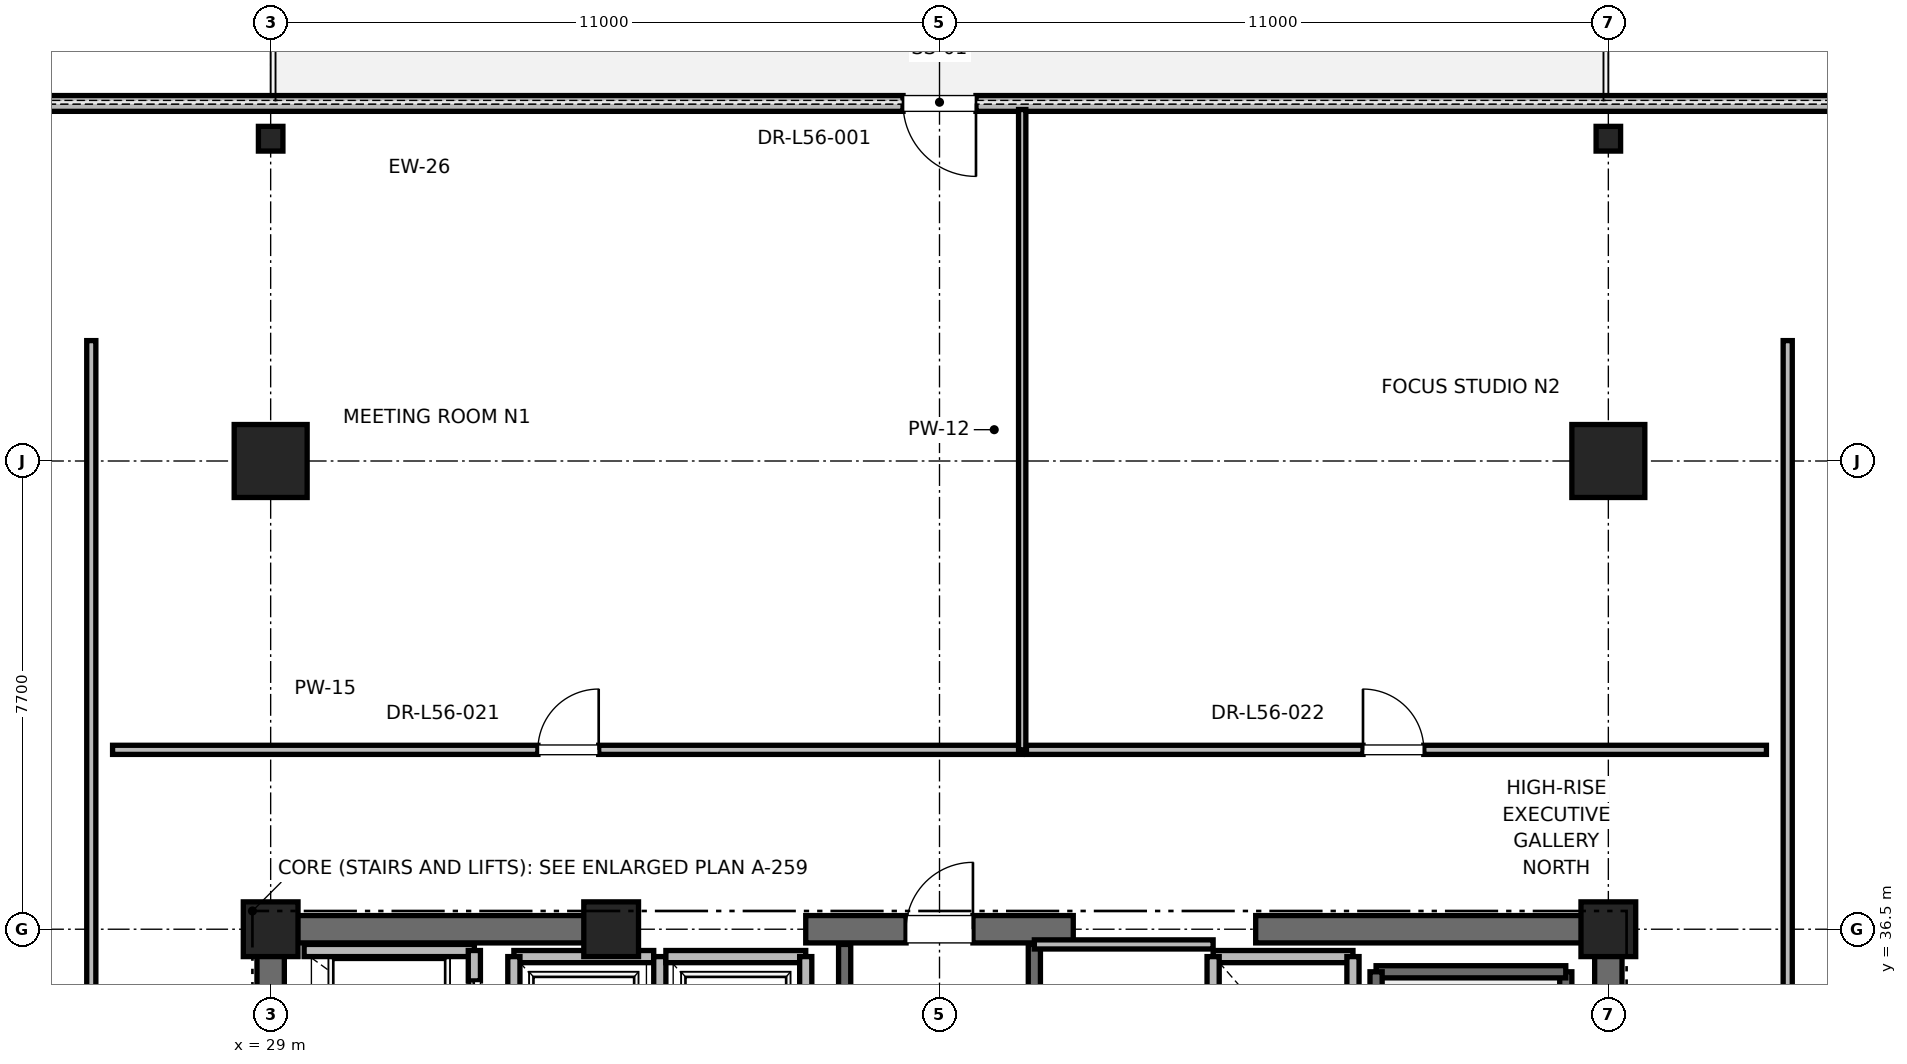
"""IFC4 building model, lengths in metres.
Left out: names, types, materials, properties, quantities, classifications, styles, units other than length and angle.
Written with IfcOpenShell. Run it as: python <this file> out.ifc"""

import sys

from ifc_helpers import new_model, si_unit, direction, frame, frame_2d, origin, origin_2d, place, context, subcontext, project, spatial, rectangle, i_section, extrude, element, fill, save


model = new_model("IFC4")
c1 = context("Model", 3, precision=1e-05, world=origin(), true_north=direction((0.0, 1.0)))
c2 = subcontext(c1, "Body", "Model", "MODEL_VIEW")
j1 = project(units=[si_unit("LENGTHUNIT", "METRE"), si_unit("PLANEANGLEUNIT", "RADIAN")], contexts=[c1])
p1 = place(None, origin())
s1 = spatial("IfcSite", under=j1, at=p1, CompositionType="ELEMENT")
p2 = place(p1, origin())
s2 = spatial("IfcBuilding", under=s1, at=p2, CompositionType="ELEMENT")
p3 = place(p2, frame((0.0, 0.0, 243.2)))
s3 = spatial("IfcBuildingStorey", under=s2, at=p3, CompositionType="ELEMENT", Elevation=243.2)
for number, where, z_axis, x_axis in (
    (1, (29.0, 44.2, 0.0), (0.0, 0.0, 1.0), (1.0, 0.0, 0.0)),
    (2, (51.0, 44.2, 0.0), (0.0, 0.0, 1.0), (1.0, 0.0, 0.0)),
):
    element("IfcColumn", number, at=place(p3, frame(where, z_axis=z_axis, x_axis=x_axis)), inside=s3, PredefinedType="COLUMN", context=c2, shape_type="SweptSolid", body=[
        extrude(rectangle(XDim=1.2, YDim=1.2, at=origin_2d()), origin(), (0.0, 0.0, 1.0), 4.0),
    ])
for number, where, z_axis, x_axis in (
    (3, (29.0, 49.5, 0.0), (0.0, 0.0, 1.0), (1.0, 0.0, 0.0)),
    (4, (51.0, 49.5, 0.0), (0.0, 0.0, 1.0), (1.0, 0.0, 0.0)),
):
    element("IfcColumn", number, at=place(p3, frame(where, z_axis=z_axis, x_axis=x_axis)), inside=s3, PredefinedType="COLUMN", context=c2, shape_type="SweptSolid", body=[
        extrude(i_section(OverallWidth=0.403, OverallDepth=0.406, WebThickness=0.027, FlangeThickness=0.043, FilletRadius=0.015, at=origin_2d()), origin(), (0.0, 0.0, 1.0), 4.0),
    ])
for number, where, z_axis, x_axis in (
    (5, (29.0, 36.5, 0.0), (0.0, 0.0, 1.0), (1.0, 0.0, 0.0)),
    (6, (51.0, 36.5, 0.0), (0.0, 0.0, 1.0), (1.0, 0.0, 0.0)),
    (7, (34.6, 36.5, 0.0), (0.0, 0.0, 1.0), (1.0, 0.0, 0.0)),
):
    element("IfcColumn", number, at=place(p3, frame(where, z_axis=z_axis, x_axis=x_axis)), inside=s3, PredefinedType="PILASTER", context=c2, shape_type="SweptSolid", body=[
        extrude(rectangle(XDim=0.9, YDim=0.9, at=origin_2d()), origin(), (0.0, 0.0, 1.0), 4.0),
    ])
p4 = place(p3, frame((29.0, 36.5, 0.0), z_axis=(0.0, 0.0, 1.0), x_axis=(1.0, 0.0, 0.0)))
e8 = element("IfcWall", 8, at=p4, inside=s3, PredefinedType="SHEAR", context=c2, shape_type="SweptSolid", body=[
    extrude(rectangle(XDim=5.8, YDim=0.45, at=frame_2d((2.9, 0.0))), origin(), (0.0, 0.0, 1.0), 3.785),
])
p5 = place(p3, frame((37.8, 36.5, 0.0), z_axis=(0.0, 0.0, 1.0), x_axis=(1.0, 0.0, 0.0)))
e9 = element("IfcWall", 9, at=p5, inside=s3, PredefinedType="SHEAR", context=c2, shape_type="SweptSolid", body=[
    extrude(rectangle(XDim=4.4, YDim=0.45, at=frame_2d((2.2, 0.0))), origin(), (0.0, 0.0, 1.0), 3.785),
])
p6 = place(p5, frame((1.65, 0.0, 0.0)))
e10 = element("IfcOpeningElement", 10, at=p6, cuts=e9, PredefinedType="OPENING", context=c2, shape_type="SweptSolid", body=[
    extrude(rectangle(XDim=1.1, YDim=2.15, at=frame_2d((0.55, 1.075))), frame((0.0, 0.225, 0.0), z_axis=(0.0, -1.0, 0.0), x_axis=(1.0, 0.0, 0.0)), (0.0, 0.0, 1.0), 0.45),
])
for number, where, z_axis, x_axis in (
    (11, (45.2, 36.5, 0.0), (0.0, 0.0, 1.0), (1.0, 0.0, 0.0)),
    (12, (29.0, 30.7, 0.0), (0.0, 0.0, 1.0), (0.0, 1.0, 0.0)),
):
    element("IfcWall", number, at=place(p3, frame(where, z_axis=z_axis, x_axis=x_axis)), inside=s3, PredefinedType="SHEAR", context=c2, shape_type="SweptSolid", body=[
        extrude(rectangle(XDim=5.8, YDim=0.45, at=frame_2d((2.9, 0.0))), origin(), (0.0, 0.0, 1.0), 3.785),
    ])
p7 = place(p3, frame((51.0, 27.7, 0.0), z_axis=(0.0, 0.0, 1.0), x_axis=(0.0, 1.0, 0.0)))
e13 = element("IfcWall", 13, at=p7, inside=s3, PredefinedType="SHEAR", context=c2, shape_type="SweptSolid", body=[
    extrude(rectangle(XDim=8.8, YDim=0.45, at=frame_2d((4.4, 0.0))), origin(), (0.0, 0.0, 1.0), 3.785),
])
p8 = place(p3, frame((62.308, 50.08, 0.0), z_axis=(0.0, 0.0, 1.0), x_axis=(-1.0, 0.0, 0.0)))
e14 = element("IfcWall", 14, at=p8, inside=s3, PredefinedType="PARAPET", context=c2, shape_type="SweptSolid", body=[
    extrude(rectangle(XDim=44.615, YDim=0.26, at=frame_2d((22.308, 0.0))), origin(), (0.0, 0.0, 1.0), 3.123),
])
p9 = place(p8, frame((4.2, 0.0, 0.85)))
e15 = element("IfcOpeningElement", 15, at=p9, cuts=e14, PredefinedType="OPENING", context=c2, shape_type="SweptSolid", body=[
    extrude(rectangle(XDim=1.6, YDim=2.1, at=frame_2d((0.8, 1.05))), frame((0.0, 0.13, 0.0), z_axis=(0.0, -1.0, 0.0), x_axis=(1.0, 0.0, 0.0)), (0.0, 0.0, 1.0), 0.26),
])
p10 = place(p8, frame((21.708, 0.0, 0.0)))
e16 = element("IfcOpeningElement", 16, at=p10, cuts=e14, PredefinedType="OPENING", context=c2, shape_type="SweptSolid", body=[
    extrude(rectangle(XDim=1.2, YDim=2.2, at=frame_2d((0.6, 1.1))), frame((0.0, 0.13, 0.0), z_axis=(0.0, -1.0, 0.0), x_axis=(1.0, 0.0, 0.0)), (0.0, 0.0, 1.0), 0.26),
])
p11 = place(p8, frame((38.815, 0.0, 0.85)))
e17 = element("IfcOpeningElement", 17, at=p11, cuts=e14, PredefinedType="OPENING", context=c2, shape_type="SweptSolid", body=[
    extrude(rectangle(XDim=1.6, YDim=2.1, at=frame_2d((0.8, 1.05))), frame((0.0, 0.13, 0.0), z_axis=(0.0, -1.0, 0.0), x_axis=(1.0, 0.0, 0.0)), (0.0, 0.0, 1.0), 0.26),
])
p12 = place(p3, frame((50.3, 27.65, 0.0), z_axis=(0.0, 0.0, 1.0), x_axis=(0.0, 1.0, 0.0)))
e18 = element("IfcWall", 18, at=p12, inside=s3, PredefinedType="SOLIDWALL", context=c2, shape_type="SweptSolid", body=[
    extrude(rectangle(XDim=8.15, YDim=0.2, at=frame_2d((4.075, 0.0))), origin(), (0.0, 0.0, 1.0), 3.785),
])
p13 = place(p3, frame((47.18, 35.8, 0.0), z_axis=(0.0, 0.0, 1.0), x_axis=(1.0, 0.0, 0.0)))
e19 = element("IfcWall", 19, at=p13, inside=s3, PredefinedType="SOLIDWALL", context=c2, shape_type="SweptSolid", body=[
    extrude(rectangle(XDim=3.12, YDim=0.2, at=frame_2d((1.56, 0.0))), origin(), (0.0, 0.0, 1.0), 3.785),
])
p14 = place(p3, frame((47.18, 27.62, 0.0), z_axis=(0.0, 0.0, 1.0), x_axis=(0.0, 1.0, 0.0)))
e20 = element("IfcWall", 20, at=p14, inside=s3, PredefinedType="SOLIDWALL", context=c2, shape_type="SweptSolid", body=[
    extrude(rectangle(XDim=8.18, YDim=0.2, at=frame_2d((4.09, 0.0))), origin(), (0.0, 0.0, 1.0), 3.785),
])
p15 = place(p3, frame((38.44, 27.38, 0.0), z_axis=(0.0, 0.0, 1.0), x_axis=(0.0, 1.0, 0.0)))
e21 = element("IfcWall", 21, at=p15, inside=s3, PredefinedType="SOLIDWALL", context=c2, shape_type="SweptSolid", body=[
    extrude(rectangle(XDim=8.87, YDim=0.2, at=frame_2d((4.435, 0.0))), origin(), (0.0, 0.0, 1.0), 3.785),
])
p16 = place(p3, frame((41.56, 27.68, 0.0), z_axis=(0.0, 0.0, 1.0), x_axis=(0.0, 1.0, 0.0)))
e22 = element("IfcWall", 22, at=p16, inside=s3, PredefinedType="SOLIDWALL", context=c2, shape_type="SweptSolid", body=[
    extrude(rectangle(XDim=8.57, YDim=0.2, at=frame_2d((4.285, 0.0))), origin(), (0.0, 0.0, 1.0), 3.785),
])
p17 = place(p3, frame((32.35, 36.15, 0.0), z_axis=(0.0, 0.0, 1.0), x_axis=(-1.0, 0.0, 0.0)))
e23 = element("IfcWall", 23, at=p17, inside=s3, PredefinedType="SOLIDWALL", context=c2, shape_type="SweptSolid", body=[
    extrude(rectangle(XDim=2.8, YDim=0.2, at=frame_2d((1.4, 0.0))), origin(), (0.0, 0.0, 1.0), 3.148),
])
p18 = place(p3, frame((32.35, 34.05, 0.0), z_axis=(0.0, 0.0, 1.0), x_axis=(0.0, 1.0, 0.0)))
e24 = element("IfcWall", 24, at=p18, inside=s3, PredefinedType="SOLIDWALL", context=c2, shape_type="SweptSolid", body=[
    extrude(rectangle(XDim=2.1, YDim=0.2, at=frame_2d((1.05, 0.0))), origin(), (0.0, 0.0, 1.0), 3.785),
])
p19 = place(p18, frame((0.5, 0.0, 0.0)))
e25 = element("IfcOpeningElement", 25, at=p19, cuts=e24, PredefinedType="OPENING", context=c2, shape_type="SweptSolid", body=[
    extrude(rectangle(XDim=1.1, YDim=2.2, at=frame_2d((0.55, 1.1))), frame((0.0, 0.1, 0.0), z_axis=(0.0, -1.0, 0.0), x_axis=(1.0, 0.0, 0.0)), (0.0, 0.0, 1.0), 0.2),
])
p20 = place(p3, frame((35.3, 36.05, 0.0), z_axis=(0.0, 0.0, 1.0), x_axis=(-1.0, 0.0, 0.0)))
e26 = element("IfcWall", 26, at=p20, inside=s3, PredefinedType="SOLIDWALL", context=c2, shape_type="SweptSolid", body=[
    extrude(rectangle(XDim=2.3, YDim=0.2, at=frame_2d((1.15, 0.0))), origin(), (0.0, 0.0, 1.0), 2.865),
])
p21 = place(p3, frame((33.0, 36.05, 0.0), z_axis=(0.0, 0.0, 1.0), x_axis=(0.0, -1.0, 0.0)))
e27 = element("IfcWall", 27, at=p21, inside=s3, PredefinedType="SOLIDWALL", context=c2, shape_type="SweptSolid", body=[
    extrude(rectangle(XDim=2.6, YDim=0.2, at=frame_2d((1.3, 0.0))), origin(), (0.0, 0.0, 1.0), 3.785),
])
p22 = place(p3, frame((35.4, 33.45, 0.0), z_axis=(0.0, 0.0, 1.0), x_axis=(0.0, 1.0, 0.0)))
e28 = element("IfcWall", 28, at=p22, inside=s3, PredefinedType="SOLIDWALL", context=c2, shape_type="SweptSolid", body=[
    extrude(rectangle(XDim=2.6, YDim=0.2, at=frame_2d((1.3, 0.0))), origin(), (0.0, 0.0, 1.0), 2.865),
])
p23 = place(p3, frame((37.8, 36.05, 0.0), z_axis=(0.0, 0.0, 1.0), x_axis=(-1.0, 0.0, 0.0)))
e29 = element("IfcWall", 29, at=p23, inside=s3, PredefinedType="SOLIDWALL", context=c2, shape_type="SweptSolid", body=[
    extrude(rectangle(XDim=2.3, YDim=0.2, at=frame_2d((1.15, 0.0))), origin(), (0.0, 0.0, 1.0), 2.865),
])
p24 = place(p3, frame((37.8, 33.45, 0.0), z_axis=(0.0, 0.0, 1.0), x_axis=(0.0, 1.0, 0.0)))
e30 = element("IfcWall", 30, at=p24, inside=s3, PredefinedType="SOLIDWALL", context=c2, shape_type="SweptSolid", body=[
    extrude(rectangle(XDim=2.6, YDim=0.2, at=frame_2d((1.3, 0.0))), origin(), (0.0, 0.0, 1.0), 2.865),
])
p25 = place(p3, frame((46.8, 36.05, 0.0), z_axis=(0.0, 0.0, 1.0), x_axis=(-1.0, 0.0, 0.0)))
e31 = element("IfcWall", 31, at=p25, inside=s3, PredefinedType="SOLIDWALL", context=c2, shape_type="SweptSolid", body=[
    extrude(rectangle(XDim=2.3, YDim=0.2, at=frame_2d((1.15, 0.0))), origin(), (0.0, 0.0, 1.0), 2.865),
])
p26 = place(p3, frame((44.5, 36.05, 0.0), z_axis=(0.0, 0.0, 1.0), x_axis=(0.0, -1.0, 0.0)))
e32 = element("IfcWall", 32, at=p26, inside=s3, PredefinedType="SOLIDWALL", context=c2, shape_type="SweptSolid", body=[
    extrude(rectangle(XDim=2.6, YDim=0.2, at=frame_2d((1.3, 0.0))), origin(), (0.0, 0.0, 1.0), 2.865),
])
p27 = place(p3, frame((46.8, 33.45, 0.0), z_axis=(0.0, 0.0, 1.0), x_axis=(0.0, 1.0, 0.0)))
e33 = element("IfcWall", 33, at=p27, inside=s3, PredefinedType="SOLIDWALL", context=c2, shape_type="SweptSolid", body=[
    extrude(rectangle(XDim=2.6, YDim=0.2, at=frame_2d((1.3, 0.0))), origin(), (0.0, 0.0, 1.0), 3.785),
])
p28 = place(p3, frame((41.56, 36.25, 0.0), z_axis=(0.0, 0.0, 1.0), x_axis=(1.0, 0.0, 0.0)))
e34 = element("IfcWall", 34, at=p28, inside=s3, PredefinedType="PARTITIONING", context=c2, shape_type="SweptSolid", body=[
    extrude(rectangle(XDim=2.94, YDim=0.15, at=frame_2d((1.47, 0.0))), origin(), (0.0, 0.0, 1.0), 2.85),
])
p29 = place(p3, frame((26.4, 39.45, 0.0), z_axis=(0.0, 0.0, 1.0), x_axis=(1.0, 0.0, 0.0)))
e35 = element("IfcWall", 35, at=p29, inside=s3, PredefinedType="PARTITIONING", context=c2, shape_type="SweptSolid", body=[
    extrude(rectangle(XDim=14.96, YDim=0.15, at=frame_2d((7.48, 0.0))), origin(), (0.0, 0.0, 1.0), 2.85),
])
p30 = place(p29, frame((6.995, 0.0, 0.0)))
e36 = element("IfcOpeningElement", 36, at=p30, cuts=e35, PredefinedType="OPENING", context=c2, shape_type="SweptSolid", body=[
    extrude(rectangle(XDim=1.0, YDim=2.15, at=frame_2d((0.5, 1.075))), frame((0.0, 0.075, 0.0), z_axis=(0.0, -1.0, 0.0), x_axis=(1.0, 0.0, 0.0)), (0.0, 0.0, 1.0), 0.15),
])
p31 = place(p3, frame((41.36, 39.45, 0.0), z_axis=(0.0, 0.0, 1.0), x_axis=(0.0, 1.0, 0.0)))
e37 = element("IfcWall", 37, at=p31, inside=s3, PredefinedType="PARTITIONING", context=c2, shape_type="SweptSolid", body=[
    extrude(rectangle(XDim=10.53, YDim=0.12, at=frame_2d((5.265, 0.0))), origin(), (0.0, 0.0, 1.0), 2.415),
])
p32 = place(p3, frame((41.43, 39.45, 0.0), z_axis=(0.0, 0.0, 1.0), x_axis=(1.0, 0.0, 0.0)))
e38 = element("IfcWall", 38, at=p32, inside=s3, PredefinedType="PARTITIONING", context=c2, shape_type="SweptSolid", body=[
    extrude(rectangle(XDim=12.17, YDim=0.15, at=frame_2d((6.085, 0.0))), origin(), (0.0, 0.0, 1.0), 2.85),
])
p33 = place(p32, frame((5.535, 0.0, 0.0)))
e39 = element("IfcOpeningElement", 39, at=p33, cuts=e38, PredefinedType="OPENING", context=c2, shape_type="SweptSolid", body=[
    extrude(rectangle(XDim=1.0, YDim=2.15, at=frame_2d((0.5, 1.075))), frame((0.0, 0.075, 0.0), z_axis=(0.0, -1.0, 0.0), x_axis=(1.0, 0.0, 0.0)), (0.0, 0.0, 1.0), 0.15),
])
p34 = place(p3, frame((26.05, 24.581, 0.0), z_axis=(0.0, 0.0, 1.0), x_axis=(0.0, 1.0, 0.0)))
e40 = element("IfcWall", 40, at=p34, inside=s3, PredefinedType="PARTITIONING", context=c2, shape_type="SweptSolid", body=[
    extrude(rectangle(XDim=21.599, YDim=0.15, at=frame_2d((10.799, 0.0))), origin(), (0.0, 0.0, 1.0), 2.85),
])
p35 = place(p34, frame((5.409, 0.0, 0.0)))
e41 = element("IfcOpeningElement", 41, at=p35, cuts=e40, PredefinedType="OPENING", context=c2, shape_type="SweptSolid", body=[
    extrude(rectangle(XDim=1.0, YDim=2.15, at=frame_2d((0.5, 1.075))), frame((0.0, 0.075, 0.0), z_axis=(0.0, -1.0, 0.0), x_axis=(1.0, 0.0, 0.0)), (0.0, 0.0, 1.0), 0.15),
])
p36 = place(p3, frame((53.95, 30.559, 0.0), z_axis=(0.0, 0.0, 1.0), x_axis=(0.0, 1.0, 0.0)))
e42 = element("IfcWall", 42, at=p36, inside=s3, PredefinedType="PARTITIONING", context=c2, shape_type="SweptSolid", body=[
    extrude(rectangle(XDim=15.621, YDim=0.15, at=frame_2d((7.811, 0.0))), origin(), (0.0, 0.0, 1.0), 2.85),
])
p37 = place(p36, frame((2.396, 0.0, 0.0)))
e43 = element("IfcOpeningElement", 43, at=p37, cuts=e42, PredefinedType="OPENING", context=c2, shape_type="SweptSolid", body=[
    extrude(rectangle(XDim=1.05, YDim=2.2, at=frame_2d((0.525, 1.1))), frame((0.0, 0.075, 0.0), z_axis=(0.0, -1.0, 0.0), x_axis=(1.0, 0.0, 0.0)), (0.0, 0.0, 1.0), 0.15),
])
p38 = place(p10, origin())
e44 = element("IfcDoor", 44, at=p38, inside=s3, OperationType="SINGLE_SWING_LEFT", PredefinedType="DOOR", context=c2, shape_type="SweptSolid", body=[
    extrude(rectangle(XDim=1.2, YDim=2.2, at=frame_2d((0.6, 1.1))), frame((0.0, 0.025, 0.0), z_axis=(0.0, -1.0, 0.0), x_axis=(1.0, 0.0, 0.0)), (0.0, 0.0, 1.0), 0.05),
])
fill(e16, e44)
p39 = place(p6, origin())
e45 = element("IfcDoor", 45, at=p39, inside=s3, OperationType="SINGLE_SWING_RIGHT", PredefinedType="DOOR", context=c2, shape_type="SweptSolid", body=[
    extrude(rectangle(XDim=1.1, YDim=2.15, at=frame_2d((0.55, 1.075))), frame((0.0, 0.025, 0.0), z_axis=(0.0, -1.0, 0.0), x_axis=(1.0, 0.0, 0.0)), (0.0, 0.0, 1.0), 0.05),
])
fill(e10, e45)
p40 = place(p19, origin())
e46 = element("IfcDoor", 46, at=p40, inside=s3, OperationType="SLIDING_TO_RIGHT", PredefinedType="DOOR", context=c2, shape_type="SweptSolid", body=[
    extrude(rectangle(XDim=1.1, YDim=2.2, at=frame_2d((0.55, 1.1))), frame((0.0, 0.025, 0.0), z_axis=(0.0, -1.0, 0.0), x_axis=(1.0, 0.0, 0.0)), (0.0, 0.0, 1.0), 0.05),
])
fill(e25, e46)
p41 = place(p30, origin())
e47 = element("IfcDoor", 47, at=p41, inside=s3, OperationType="SINGLE_SWING_RIGHT", PredefinedType="DOOR", context=c2, shape_type="SweptSolid", body=[
    extrude(rectangle(XDim=1.0, YDim=2.15, at=frame_2d((0.5, 1.075))), frame((0.0, 0.025, 0.0), z_axis=(0.0, -1.0, 0.0), x_axis=(1.0, 0.0, 0.0)), (0.0, 0.0, 1.0), 0.05),
])
fill(e36, e47)
p42 = place(p33, origin())
e48 = element("IfcDoor", 48, at=p42, inside=s3, OperationType="SINGLE_SWING_LEFT", PredefinedType="DOOR", context=c2, shape_type="SweptSolid", body=[
    extrude(rectangle(XDim=1.0, YDim=2.15, at=frame_2d((0.5, 1.075))), frame((0.0, 0.025, 0.0), z_axis=(0.0, -1.0, 0.0), x_axis=(1.0, 0.0, 0.0)), (0.0, 0.0, 1.0), 0.05),
])
fill(e39, e48)
save(model, sys.argv[1])
